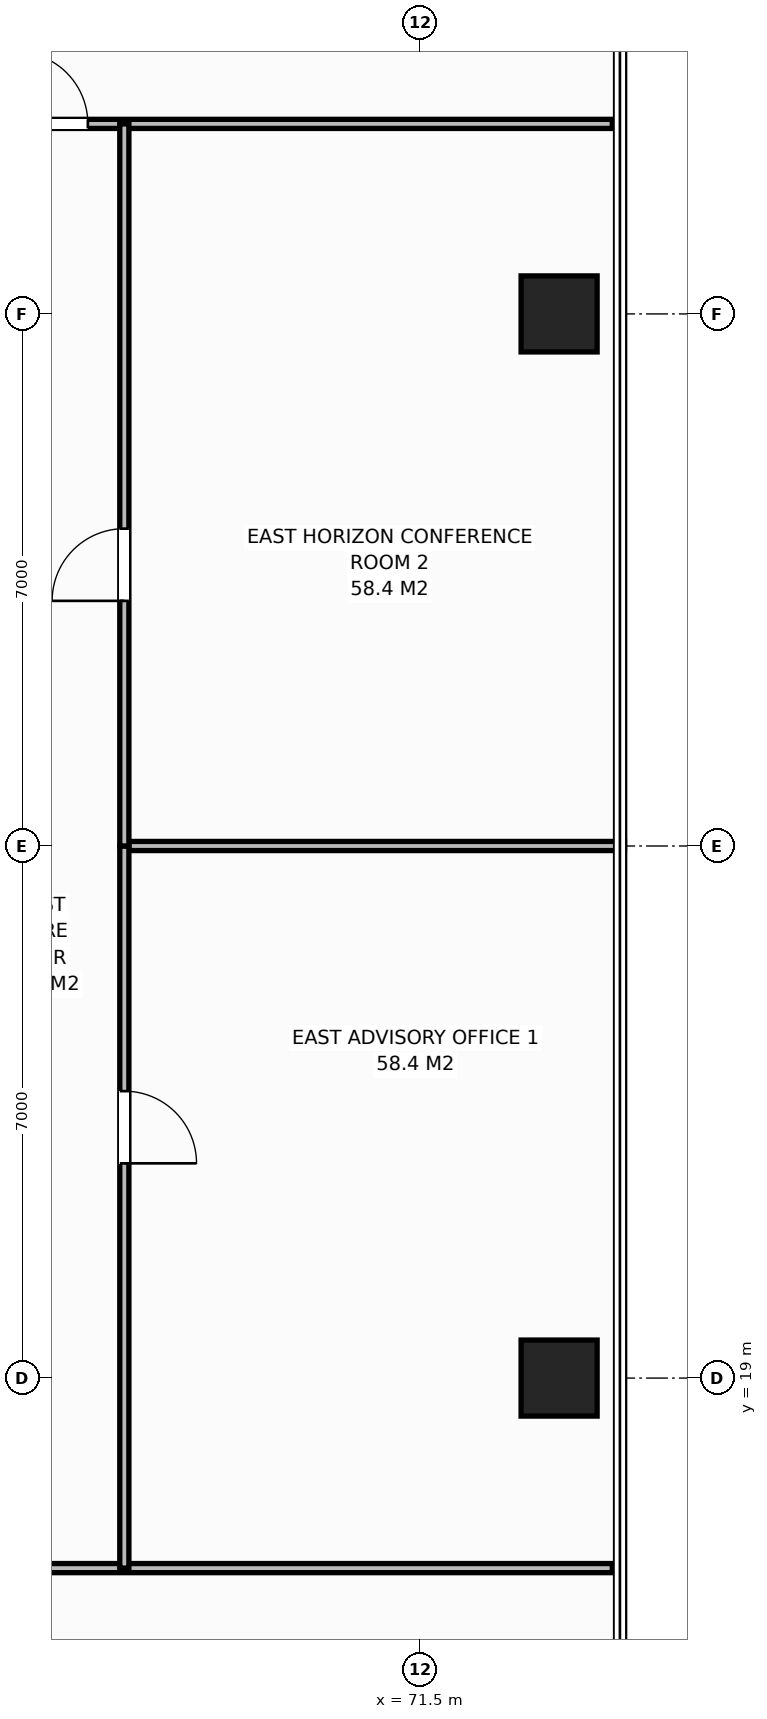
"""IFC4 building model, lengths in metres.
Left out: names, types, materials, properties, quantities, classifications, styles, units other than length and angle.
Written with IfcOpenShell. Run it as: python <this file> out.ifc"""

import sys

from ifc_helpers import new_model, si_unit, direction, frame, frame_2d, origin, origin_2d, place, context, subcontext, project, spatial, rectangle, extrude, element, fill, save


model = new_model("IFC4")
c1 = context("Model", 3, precision=1e-05, world=origin(), true_north=direction((0.0, 1.0)))
c2 = subcontext(c1, "Body", "Model", "MODEL_VIEW")
j1 = project(units=[si_unit("LENGTHUNIT", "METRE"), si_unit("PLANEANGLEUNIT", "RADIAN")], contexts=[c1])
p1 = place(None, origin())
s1 = spatial("IfcSite", under=j1, at=p1, CompositionType="ELEMENT")
p2 = place(p1, origin())
s2 = spatial("IfcBuilding", under=s1, at=p2, CompositionType="ELEMENT")
p3 = place(p2, frame((0.0, 0.0, 170.8)))
s3 = spatial("IfcBuildingStorey", under=s2, at=p3, CompositionType="ELEMENT", Elevation=170.8)
for number, where, z_axis, x_axis in (
    (1, (73.32, 19.0, 0.0), (0.0, 0.0, 1.0), (1.0, 0.0, 0.0)),
    (2, (73.32, 33.0, 0.0), (0.0, 0.0, 1.0), (1.0, 0.0, 0.0)),
):
    element("IfcColumn", number, at=place(p3, frame(where, z_axis=z_axis, x_axis=x_axis)), inside=s3, PredefinedType="COLUMN", context=c2, shape_type="SweptSolid", body=[
        extrude(rectangle(XDim=1.0, YDim=1.0, at=origin_2d()), origin(), (0.0, 0.0, 1.0), 3.8),
    ])
p4 = place(p3, frame((64.86, 35.5, 0.0), z_axis=(0.0, 0.0, 1.0), x_axis=(1.0, 0.0, 0.0)))
e3 = element("IfcWall", 3, at=p4, inside=s3, PredefinedType="PARTITIONING", context=c2, shape_type="SweptSolid", body=[
    extrude(rectangle(XDim=9.16, YDim=0.12, at=frame_2d((4.58, 0.0))), origin(), (0.0, 0.0, 1.0), 3.572),
])
p5 = place(p4, frame((1.31, 0.0, 0.0)))
e4 = element("IfcOpeningElement", 4, at=p5, cuts=e3, PredefinedType="OPENING", context=c2, shape_type="SweptSolid", body=[
    extrude(rectangle(XDim=0.95, YDim=2.15, at=frame_2d((0.475, 1.075))), frame((0.0, 0.07, 0.0), z_axis=(0.0, -1.0, 0.0), x_axis=(1.0, 0.0, 0.0)), (0.0, 0.0, 1.0), 0.14),
])
p6 = place(p3, frame((61.704, 16.5, 0.0), z_axis=(0.0, 0.0, 1.0), x_axis=(1.0, 0.0, 0.0)))
e5 = element("IfcWall", 5, at=p6, inside=s3, PredefinedType="PARTITIONING", context=c2, shape_type="SweptSolid", body=[
    extrude(rectangle(XDim=12.316, YDim=0.12, at=frame_2d((6.158, 0.0))), origin(), (0.0, 0.0, 1.0), 3.572),
])
p7 = place(p6, frame((0.48, 0.0, 0.0)))
e6 = element("IfcOpeningElement", 6, at=p7, cuts=e5, PredefinedType="OPENING", context=c2, shape_type="SweptSolid", body=[
    extrude(rectangle(XDim=0.95, YDim=2.15, at=frame_2d((0.475, 1.075))), frame((0.0, 0.07, 0.0), z_axis=(0.0, -1.0, 0.0), x_axis=(1.0, 0.0, 0.0)), (0.0, 0.0, 1.0), 0.14),
])
p8 = place(p3, frame((67.6, 26.0, 0.0), z_axis=(0.0, 0.0, 1.0), x_axis=(1.0, 0.0, 0.0)))
e7 = element("IfcWall", 7, at=p8, inside=s3, PredefinedType="PARTITIONING", context=c2, shape_type="SweptSolid", body=[
    extrude(rectangle(XDim=6.58, YDim=0.12, at=frame_2d((3.29, 0.0))), origin(), (0.0, 0.0, 1.0), 3.572),
])
p9 = place(p3, frame((67.6, 16.5, 0.0), z_axis=(0.0, 0.0, 1.0), x_axis=(0.0, 1.0, 0.0)))
e8 = element("IfcWall", 8, at=p9, inside=s3, PredefinedType="PARTITIONING", context=c2, shape_type="SweptSolid", body=[
    extrude(rectangle(XDim=9.5, YDim=0.12, at=frame_2d((4.75, 0.0))), origin(), (0.0, 0.0, 1.0), 3.572),
])
p10 = place(p9, frame((5.325, 0.0, 0.0)))
e9 = element("IfcOpeningElement", 9, at=p10, cuts=e8, PredefinedType="OPENING", context=c2, shape_type="SweptSolid", body=[
    extrude(rectangle(XDim=0.95, YDim=2.15, at=frame_2d((0.475, 1.075))), frame((0.0, 0.07, 0.0), z_axis=(0.0, -1.0, 0.0), x_axis=(1.0, 0.0, 0.0)), (0.0, 0.0, 1.0), 0.14),
])
p11 = place(p3, frame((67.6, 26.0, 0.0), z_axis=(0.0, 0.0, 1.0), x_axis=(0.0, 1.0, 0.0)))
e10 = element("IfcWall", 10, at=p11, inside=s3, PredefinedType="PARTITIONING", context=c2, shape_type="SweptSolid", body=[
    extrude(rectangle(XDim=9.5, YDim=0.12, at=frame_2d((4.75, 0.0))), origin(), (0.0, 0.0, 1.0), 3.572),
])
p12 = place(p11, frame((3.225, 0.0, 0.0)))
e11 = element("IfcOpeningElement", 11, at=p12, cuts=e10, PredefinedType="OPENING", context=c2, shape_type="SweptSolid", body=[
    extrude(rectangle(XDim=0.95, YDim=2.15, at=frame_2d((0.475, 1.075))), frame((0.0, 0.07, 0.0), z_axis=(0.0, -1.0, 0.0), x_axis=(1.0, 0.0, 0.0)), (0.0, 0.0, 1.0), 0.14),
])
p13 = place(p5, origin())
e12 = element("IfcDoor", 12, at=p13, inside=s3, OperationType="SINGLE_SWING_LEFT", PredefinedType="DOOR", context=c2, shape_type="SweptSolid", body=[
    extrude(rectangle(XDim=0.95, YDim=2.15, at=frame_2d((0.475, 1.075))), frame((0.0, 0.025, 0.0), z_axis=(0.0, -1.0, 0.0), x_axis=(1.0, 0.0, 0.0)), (0.0, 0.0, 1.0), 0.05),
])
fill(e4, e12)
p14 = place(p10, origin())
e13 = element("IfcDoor", 13, at=p14, inside=s3, OperationType="SINGLE_SWING_RIGHT", PredefinedType="DOOR", context=c2, shape_type="SweptSolid", body=[
    extrude(rectangle(XDim=0.95, YDim=2.15, at=frame_2d((0.475, 1.075))), frame((0.0, 0.025, 0.0), z_axis=(0.0, -1.0, 0.0), x_axis=(1.0, 0.0, 0.0)), (0.0, 0.0, 1.0), 0.05),
])
fill(e9, e13)
p15 = place(p12, origin())
e14 = element("IfcDoor", 14, at=p15, inside=s3, OperationType="SINGLE_SWING_LEFT", PredefinedType="DOOR", context=c2, shape_type="SweptSolid", body=[
    extrude(rectangle(XDim=0.95, YDim=2.15, at=frame_2d((0.475, 1.075))), frame((0.0, 0.025, 0.0), z_axis=(0.0, -1.0, 0.0), x_axis=(1.0, 0.0, 0.0)), (0.0, 0.0, 1.0), 0.05),
])
fill(e11, e14)
save(model, sys.argv[1])
